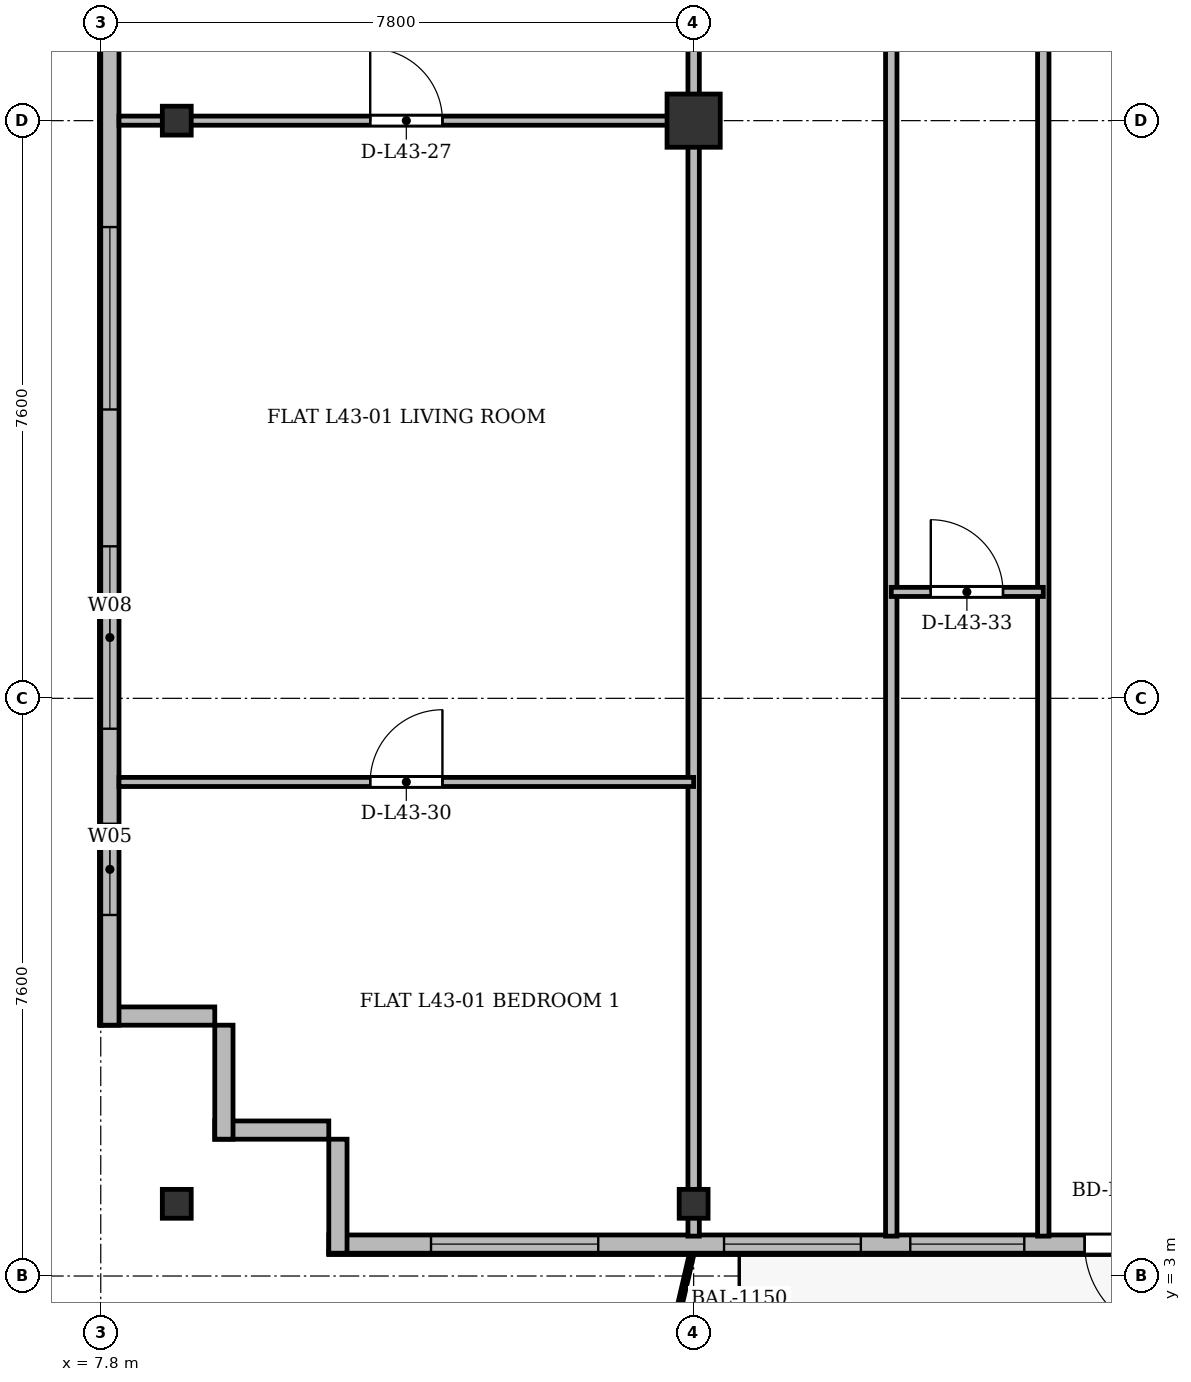
"""IFC4 building model, lengths in metres.
Left out: names, types, materials, properties, quantities, classifications, styles, units other than length and angle.
Written with IfcOpenShell. Run it as: python <this file> out.ifc"""

import sys

from ifc_helpers import new_model, si_unit, direction, frame, frame_2d, origin, origin_2d, place, context, subcontext, project, spatial, rectangle, i_section, extrude, source, transform, mapped, element, fill, save


model = new_model("IFC4")
c1 = context("Model", 3, precision=1e-05, world=origin(), true_north=direction((0.0, 1.0)))
c2 = subcontext(c1, "Body", "Model", "MODEL_VIEW")
j1 = project(units=[si_unit("LENGTHUNIT", "METRE"), si_unit("PLANEANGLEUNIT", "RADIAN")], contexts=[c1])
p1 = place(None, origin())
s1 = spatial("IfcSite", under=j1, at=p1, CompositionType="ELEMENT")
p2 = place(p1, origin())
s2 = spatial("IfcBuilding", under=s1, at=p2, CompositionType="ELEMENT")
p3 = place(p2, frame((0.0, 0.0, 164.5)))
s3 = spatial("IfcBuildingStorey", under=s2, at=p3, CompositionType="ELEMENT", Elevation=164.5)
m1 = source(origin(), c2, "Body", "SweptSolid", [
    extrude(i_section(OverallWidth=0.38, OverallDepth=0.38, WebThickness=0.02, FlangeThickness=0.03, at=origin_2d()), origin(), (0.0, 0.0, 1.0), 3.6),
])
for number, where, z_axis, x_axis in (
    (1, (8.8, 3.95, 0.0), (0.0, 0.0, 1.0), (1.0, 0.0, 0.0)),
    (2, (8.8, 18.2, 0.0), (0.0, 0.0, 1.0), (1.0, 0.0, 0.0)),
    (3, (15.6, 3.95, 0.0), (0.0, 0.0, 1.0), (1.0, 0.0, 0.0)),
):
    element("IfcColumn", number, at=place(p3, frame(where, z_axis=z_axis, x_axis=x_axis)), inside=s3, PredefinedType="COLUMN", context=c2, shape_type="MappedRepresentation", body=[
        mapped(m1, transform((0.0, 0.0, 0.0), x_axis=(1.0, 0.0, 0.0), y_axis=(0.0, 1.0, 0.0), z_axis=(0.0, 0.0, 1.0), scale=1.0)),
    ])
m2 = source(origin(), c2, "Body", "SweptSolid", [
    extrude(rectangle(XDim=0.7, YDim=0.7, at=origin_2d()), origin(), (0.0, 0.0, 1.0), 3.6),
])
p4 = place(p3, frame((15.6, 18.2, 0.0), z_axis=(0.0, 0.0, 1.0), x_axis=(1.0, 0.0, 0.0)))
e4 = element("IfcColumn", 4, at=p4, inside=s3, PredefinedType="COLUMN", context=c2, shape_type="MappedRepresentation", body=[
    mapped(m2, transform((0.0, 0.0, 0.0), x_axis=(1.0, 0.0, 0.0), y_axis=(0.0, 1.0, 0.0), z_axis=(0.0, 0.0, 1.0), scale=1.0)),
])
for number, where, z_axis, x_axis in (
    (5, (10.8, 4.92, 0.0), (0.0, 0.0, 1.0), (-1.0, 0.0, 0.0)),
    (6, (9.42, 4.8, 0.0), (0.0, 0.0, 1.0), (0.0, 1.0, 0.0)),
):
    element("IfcWall", number, at=place(p3, frame(where, z_axis=z_axis, x_axis=x_axis)), inside=s3, PredefinedType="SOLIDWALL", context=c2, shape_type="SweptSolid", body=[
        extrude(rectangle(XDim=1.5, YDim=0.24, at=frame_2d((0.75, 0.0))), origin(), (0.0, 0.0, 1.0), 3.35),
    ])
p5 = place(p3, frame((9.3, 6.42, 0.0), z_axis=(0.0, 0.0, 1.0), x_axis=(-1.0, 0.0, 0.0)))
e7 = element("IfcWall", 7, at=p5, inside=s3, PredefinedType="SOLIDWALL", context=c2, shape_type="SweptSolid", body=[
    extrude(rectangle(XDim=1.5, YDim=0.24, at=frame_2d((0.75, 0.0))), origin(), (0.0, 0.0, 1.0), 2.85),
])
p6 = place(p3, frame((7.92, 6.3, 0.0), z_axis=(0.0, 0.0, 1.0), x_axis=(0.0, 1.0, 0.0)))
e8 = element("IfcWall", 8, at=p6, inside=s3, PredefinedType="SOLIDWALL", context=c2, shape_type="SweptSolid", body=[
    extrude(rectangle(XDim=39.2, YDim=0.24, at=frame_2d((19.6, 0.0))), origin(), (0.0, 0.0, 1.0), 3.35),
])
p7 = place(p6, frame((1.45, 0.0, 0.92)))
e9 = element("IfcOpeningElement", 9, at=p7, cuts=e8, PredefinedType="OPENING", context=c2, shape_type="SweptSolid", body=[
    extrude(rectangle(XDim=1.2, YDim=1.65, at=frame_2d((0.6, 0.825))), frame((0.0, 0.13, 0.0), z_axis=(0.0, -1.0, 0.0), x_axis=(1.0, 0.0, 0.0)), (0.0, 0.0, 1.0), 0.26),
])
p8 = place(p6, frame((3.9, 0.0, 0.92)))
e10 = element("IfcOpeningElement", 10, at=p8, cuts=e8, PredefinedType="OPENING", context=c2, shape_type="SweptSolid", body=[
    extrude(rectangle(XDim=2.4, YDim=2.1, at=frame_2d((1.2, 1.05))), frame((0.0, 0.13, 0.0), z_axis=(0.0, -1.0, 0.0), x_axis=(1.0, 0.0, 0.0)), (0.0, 0.0, 1.0), 0.26),
])
p9 = place(p6, frame((8.1, 0.0, 0.92)))
e11 = element("IfcOpeningElement", 11, at=p9, cuts=e8, PredefinedType="OPENING", context=c2, shape_type="SweptSolid", body=[
    extrude(rectangle(XDim=2.4, YDim=2.1, at=frame_2d((1.2, 1.05))), frame((0.0, 0.13, 0.0), z_axis=(0.0, -1.0, 0.0), x_axis=(1.0, 0.0, 0.0)), (0.0, 0.0, 1.0), 0.26),
])
p10 = place(p6, frame((15.3, 0.0, 0.92)))
e12 = element("IfcOpeningElement", 12, at=p10, cuts=e8, PredefinedType="OPENING", context=c2, shape_type="SweptSolid", body=[
    extrude(rectangle(XDim=2.4, YDim=2.1, at=frame_2d((1.2, 1.05))), frame((0.0, 0.13, 0.0), z_axis=(0.0, -1.0, 0.0), x_axis=(1.0, 0.0, 0.0)), (0.0, 0.0, 1.0), 0.26),
])
p11 = place(p6, frame((29.3, 0.0, 0.92)))
e13 = element("IfcOpeningElement", 13, at=p11, cuts=e8, PredefinedType="OPENING", context=c2, shape_type="SweptSolid", body=[
    extrude(rectangle(XDim=2.4, YDim=2.1, at=frame_2d((1.2, 1.05))), frame((0.0, 0.13, 0.0), z_axis=(0.0, -1.0, 0.0), x_axis=(1.0, 0.0, 0.0)), (0.0, 0.0, 1.0), 0.26),
])
p12 = place(p6, frame((36.85, 0.0, 0.92)))
e14 = element("IfcOpeningElement", 14, at=p12, cuts=e8, PredefinedType="OPENING", context=c2, shape_type="SweptSolid", body=[
    extrude(rectangle(XDim=1.2, YDim=1.65, at=frame_2d((0.6, 0.825))), frame((0.0, 0.13, 0.0), z_axis=(0.0, -1.0, 0.0), x_axis=(1.0, 0.0, 0.0)), (0.0, 0.0, 1.0), 0.26),
])
p13 = place(p3, frame((63.6, 3.42, 0.0), z_axis=(0.0, 0.0, 1.0), x_axis=(-1.0, 0.0, 0.0)))
e15 = element("IfcWall", 15, at=p13, inside=s3, PredefinedType="SOLIDWALL", context=c2, shape_type="SweptSolid", body=[
    extrude(rectangle(XDim=52.8, YDim=0.24, at=frame_2d((26.4, 0.0))), origin(), (0.0, 0.0, 1.0), 3.35),
])
p14 = place(p13, frame((1.445, 0.0, 0.9)))
e16 = element("IfcOpeningElement", 16, at=p14, cuts=e15, PredefinedType="OPENING", context=c2, shape_type="SweptSolid", body=[
    extrude(rectangle(XDim=2.0, YDim=1.95, at=frame_2d((1.0, 0.975))), frame((0.0, 0.13, 0.0), z_axis=(0.0, -1.0, 0.0), x_axis=(1.0, 0.0, 0.0)), (0.0, 0.0, 1.0), 0.26),
])
p15 = place(p13, frame((5.275, 0.0, 0.9)))
e17 = element("IfcOpeningElement", 17, at=p15, cuts=e15, PredefinedType="OPENING", context=c2, shape_type="SweptSolid", body=[
    extrude(rectangle(XDim=1.65, YDim=1.85, at=frame_2d((0.825, 0.925))), frame((0.0, 0.13, 0.0), z_axis=(0.0, -1.0, 0.0), x_axis=(1.0, 0.0, 0.0)), (0.0, 0.0, 1.0), 0.26),
])
p16 = place(p13, frame((7.65, 0.0, 0.9)))
e18 = element("IfcOpeningElement", 18, at=p16, cuts=e15, PredefinedType="OPENING", context=c2, shape_type="SweptSolid", body=[
    extrude(rectangle(XDim=1.5, YDim=1.75, at=frame_2d((0.75, 0.875))), frame((0.0, 0.13, 0.0), z_axis=(0.0, -1.0, 0.0), x_axis=(1.0, 0.0, 0.0)), (0.0, 0.0, 1.0), 0.26),
])
p17 = place(p13, frame((9.9, 0.0, 0.9)))
e19 = element("IfcOpeningElement", 19, at=p17, cuts=e15, PredefinedType="OPENING", context=c2, shape_type="SweptSolid", body=[
    extrude(rectangle(XDim=2.2, YDim=1.8, at=frame_2d((1.1, 0.9))), frame((0.0, 0.13, 0.0), z_axis=(0.0, -1.0, 0.0), x_axis=(1.0, 0.0, 0.0)), (0.0, 0.0, 1.0), 0.26),
])
p18 = place(p13, frame((13.62, 0.0, 0.0)))
e20 = element("IfcOpeningElement", 20, at=p18, cuts=e15, PredefinedType="OPENING", context=c2, shape_type="SweptSolid", body=[
    extrude(rectangle(XDim=1.2, YDim=2.2, at=frame_2d((0.6, 1.1))), frame((0.0, 0.13, 0.0), z_axis=(0.0, -1.0, 0.0), x_axis=(1.0, 0.0, 0.0)), (0.0, 0.0, 1.0), 0.26),
])
p19 = place(p13, frame((15.45, 0.0, 0.9)))
e21 = element("IfcOpeningElement", 21, at=p19, cuts=e15, PredefinedType="OPENING", context=c2, shape_type="SweptSolid", body=[
    extrude(rectangle(XDim=1.5, YDim=1.75, at=frame_2d((0.75, 0.875))), frame((0.0, 0.13, 0.0), z_axis=(0.0, -1.0, 0.0), x_axis=(1.0, 0.0, 0.0)), (0.0, 0.0, 1.0), 0.26),
])
p20 = place(p13, frame((17.775, 0.0, 0.9)))
e22 = element("IfcOpeningElement", 22, at=p20, cuts=e15, PredefinedType="OPENING", context=c2, shape_type="SweptSolid", body=[
    extrude(rectangle(XDim=1.65, YDim=1.85, at=frame_2d((0.825, 0.925))), frame((0.0, 0.13, 0.0), z_axis=(0.0, -1.0, 0.0), x_axis=(1.0, 0.0, 0.0)), (0.0, 0.0, 1.0), 0.26),
])
p21 = place(p13, frame((22.2, 0.0, 0.9)))
e23 = element("IfcOpeningElement", 23, at=p21, cuts=e15, PredefinedType="OPENING", context=c2, shape_type="SweptSolid", body=[
    extrude(rectangle(XDim=1.8, YDim=1.8, at=frame_2d((0.9, 0.9))), frame((0.0, 0.13, 0.0), z_axis=(0.0, -1.0, 0.0), x_axis=(1.0, 0.0, 0.0)), (0.0, 0.0, 1.0), 0.26),
])
p22 = place(p13, frame((28.6, 0.0, 0.9)))
e24 = element("IfcOpeningElement", 24, at=p22, cuts=e15, PredefinedType="OPENING", context=c2, shape_type="SweptSolid", body=[
    extrude(rectangle(XDim=2.2, YDim=1.8, at=frame_2d((1.1, 0.9))), frame((0.0, 0.13, 0.0), z_axis=(0.0, -1.0, 0.0), x_axis=(1.0, 0.0, 0.0)), (0.0, 0.0, 1.0), 0.26),
])
p23 = place(p13, frame((35.85, 0.0, 0.9)))
e25 = element("IfcOpeningElement", 25, at=p23, cuts=e15, PredefinedType="OPENING", context=c2, shape_type="SweptSolid", body=[
    extrude(rectangle(XDim=1.5, YDim=1.75, at=frame_2d((0.75, 0.875))), frame((0.0, 0.13, 0.0), z_axis=(0.0, -1.0, 0.0), x_axis=(1.0, 0.0, 0.0)), (0.0, 0.0, 1.0), 0.26),
])
p24 = place(p13, frame((41.656, 0.0, 0.0)))
e26 = element("IfcOpeningElement", 26, at=p24, cuts=e15, PredefinedType="OPENING", context=c2, shape_type="SweptSolid", body=[
    extrude(rectangle(XDim=1.2, YDim=2.2, at=frame_2d((0.6, 1.1))), frame((0.0, 0.13, 0.0), z_axis=(0.0, -1.0, 0.0), x_axis=(1.0, 0.0, 0.0)), (0.0, 0.0, 1.0), 0.26),
])
p25 = place(p13, frame((43.65, 0.0, 0.9)))
e27 = element("IfcOpeningElement", 27, at=p25, cuts=e15, PredefinedType="OPENING", context=c2, shape_type="SweptSolid", body=[
    extrude(rectangle(XDim=1.5, YDim=1.75, at=frame_2d((0.75, 0.875))), frame((0.0, 0.13, 0.0), z_axis=(0.0, -1.0, 0.0), x_axis=(1.0, 0.0, 0.0)), (0.0, 0.0, 1.0), 0.26),
])
p26 = place(p13, frame((45.8, 0.0, 0.9)))
e28 = element("IfcOpeningElement", 28, at=p26, cuts=e15, PredefinedType="OPENING", context=c2, shape_type="SweptSolid", body=[
    extrude(rectangle(XDim=1.8, YDim=1.8, at=frame_2d((0.9, 0.9))), frame((0.0, 0.13, 0.0), z_axis=(0.0, -1.0, 0.0), x_axis=(1.0, 0.0, 0.0)), (0.0, 0.0, 1.0), 0.26),
])
p27 = place(p13, frame((49.255, 0.0, 0.9)))
e29 = element("IfcOpeningElement", 29, at=p27, cuts=e15, PredefinedType="OPENING", context=c2, shape_type="SweptSolid", body=[
    extrude(rectangle(XDim=2.2, YDim=1.8, at=frame_2d((1.1, 0.9))), frame((0.0, 0.13, 0.0), z_axis=(0.0, -1.0, 0.0), x_axis=(1.0, 0.0, 0.0)), (0.0, 0.0, 1.0), 0.26),
])
p28 = place(p3, frame((10.92, 3.3, 0.0), z_axis=(0.0, 0.0, 1.0), x_axis=(0.0, 1.0, 0.0)))
e30 = element("IfcWall", 30, at=p28, inside=s3, PredefinedType="SOLIDWALL", context=c2, shape_type="SweptSolid", body=[
    extrude(rectangle(XDim=1.5, YDim=0.24, at=frame_2d((0.75, 0.0))), origin(), (0.0, 0.0, 1.0), 2.75),
])
p29 = place(p3, frame((15.6, 3.525, 0.0), z_axis=(0.0, 0.0, 1.0), x_axis=(0.0, 1.0, 0.0)))
e31 = element("IfcWall", 31, at=p29, inside=s3, PredefinedType="PARTITIONING", context=c2, shape_type="SweptSolid", body=[
    extrude(rectangle(XDim=27.275, YDim=0.15, at=frame_2d((13.638, 0.0))), origin(), (0.0, 0.0, 1.0), 2.85),
])
p30 = place(p3, frame((8.04, 18.2, 0.0), z_axis=(0.0, 0.0, 1.0), x_axis=(1.0, 0.0, 0.0)))
e32 = element("IfcWall", 32, at=p30, inside=s3, PredefinedType="PARTITIONING", context=c2, shape_type="SweptSolid", body=[
    extrude(rectangle(XDim=7.56, YDim=0.12, at=frame_2d((3.78, 0.0))), origin(), (0.0, 0.0, 1.0), 2.75),
])
p31 = place(p30, frame((3.305, 0.0, 0.0)))
e33 = element("IfcOpeningElement", 33, at=p31, cuts=e32, PredefinedType="OPENING", context=c2, shape_type="SweptSolid", body=[
    extrude(rectangle(XDim=0.95, YDim=2.15, at=frame_2d((0.475, 1.075))), frame((0.0, 0.07, 0.0), z_axis=(0.0, -1.0, 0.0), x_axis=(1.0, 0.0, 0.0)), (0.0, 0.0, 1.0), 0.14),
])
p32 = place(p3, frame((8.04, 9.5, 0.0), z_axis=(0.0, 0.0, 1.0), x_axis=(1.0, 0.0, 0.0)))
e34 = element("IfcWall", 34, at=p32, inside=s3, PredefinedType="PARTITIONING", context=c2, shape_type="SweptSolid", body=[
    extrude(rectangle(XDim=7.56, YDim=0.12, at=frame_2d((3.78, 0.0))), origin(), (0.0, 0.0, 1.0), 2.85),
])
p33 = place(p32, frame((3.305, 0.0, 0.0)))
e35 = element("IfcOpeningElement", 35, at=p33, cuts=e34, PredefinedType="OPENING", context=c2, shape_type="SweptSolid", body=[
    extrude(rectangle(XDim=0.95, YDim=2.15, at=frame_2d((0.475, 1.075))), frame((0.0, 0.07, 0.0), z_axis=(0.0, -1.0, 0.0), x_axis=(1.0, 0.0, 0.0)), (0.0, 0.0, 1.0), 0.14),
])
for number, where, z_axis, x_axis in (
    (36, (18.2, 3.525, 0.0), (0.0, 0.0, 1.0), (0.0, 1.0, 0.0)),
    (37, (20.2, 3.525, 0.0), (0.0, 0.0, 1.0), (0.0, 1.0, 0.0)),
):
    element("IfcWall", number, at=place(p3, frame(where, z_axis=z_axis, x_axis=x_axis)), inside=s3, PredefinedType="PARTITIONING", context=c2, shape_type="SweptSolid", body=[
        extrude(rectangle(XDim=27.275, YDim=0.15, at=frame_2d((13.638, 0.0))), origin(), (0.0, 0.0, 1.0), 2.75),
    ])
p34 = place(p3, frame((18.2, 12.0, 0.0), z_axis=(0.0, 0.0, 1.0), x_axis=(1.0, 0.0, 0.0)))
e38 = element("IfcWall", 38, at=p34, inside=s3, PredefinedType="PARTITIONING", context=c2, shape_type="SweptSolid", body=[
    extrude(rectangle(XDim=2.0, YDim=0.12, at=frame_2d((1.0, 0.0))), origin(), (0.0, 0.0, 1.0), 3.35),
])
p35 = place(p34, frame((0.52, 0.0, 0.0)))
e39 = element("IfcOpeningElement", 39, at=p35, cuts=e38, PredefinedType="OPENING", context=c2, shape_type="SweptSolid", body=[
    extrude(rectangle(XDim=0.95, YDim=2.15, at=frame_2d((0.475, 1.075))), frame((0.0, 0.07, 0.0), z_axis=(0.0, -1.0, 0.0), x_axis=(1.0, 0.0, 0.0)), (0.0, 0.0, 1.0), 0.14),
])
m3 = source(origin(), c2, "Body", "SweptSolid", [
    extrude(rectangle(XDim=1.2, YDim=1.65, at=frame_2d((0.6, 0.825))), frame((0.0, 0.03, 0.0), z_axis=(0.0, -1.0, 0.0), x_axis=(1.0, 0.0, 0.0)), (0.0, 0.0, 1.0), 0.06),
])
p36 = place(p7, origin())
e40 = element("IfcWindow", 40, at=p36, inside=s3, PartitioningType="SINGLE_PANEL", PredefinedType="WINDOW", context=c2, shape_type="MappedRepresentation", body=[
    mapped(m3, transform((0.0, 0.0, 0.0), x_axis=(1.0, 0.0, 0.0), y_axis=(0.0, 1.0, 0.0), z_axis=(0.0, 0.0, 1.0), scale=1.0)),
])
fill(e9, e40)
m4 = source(origin(), c2, "Body", "SweptSolid", [
    extrude(rectangle(XDim=2.4, YDim=2.1, at=frame_2d((1.2, 1.05))), frame((0.0, 0.03, 0.0), z_axis=(0.0, -1.0, 0.0), x_axis=(1.0, 0.0, 0.0)), (0.0, 0.0, 1.0), 0.06),
])
p37 = place(p8, origin())
e41 = element("IfcWindow", 41, at=p37, inside=s3, PartitioningType="SINGLE_PANEL", PredefinedType="WINDOW", context=c2, shape_type="MappedRepresentation", body=[
    mapped(m4, transform((0.0, 0.0, 0.0), x_axis=(1.0, 0.0, 0.0), y_axis=(0.0, 1.0, 0.0), z_axis=(0.0, 0.0, 1.0), scale=1.0)),
])
fill(e10, e41)
p38 = place(p9, origin())
e42 = element("IfcWindow", 42, at=p38, inside=s3, PartitioningType="SINGLE_PANEL", PredefinedType="WINDOW", context=c2, shape_type="MappedRepresentation", body=[
    mapped(m4, transform((0.0, 0.0, 0.0), x_axis=(1.0, 0.0, 0.0), y_axis=(0.0, 1.0, 0.0), z_axis=(0.0, 0.0, 1.0), scale=1.0)),
])
fill(e11, e42)
m5 = source(origin(), c2, "Body", "SweptSolid", [
    extrude(rectangle(XDim=1.2, YDim=2.2, at=frame_2d((0.6, 1.1))), frame((0.0, 0.025, 0.0), z_axis=(0.0, -1.0, 0.0), x_axis=(1.0, 0.0, 0.0)), (0.0, 0.0, 1.0), 0.05),
])
p39 = place(p24, origin())
e43 = element("IfcDoor", 43, at=p39, inside=s3, OperationType="SINGLE_SWING_LEFT", PredefinedType="DOOR", context=c2, shape_type="MappedRepresentation", body=[
    mapped(m5, transform((0.0, 0.0, 0.0), x_axis=(1.0, 0.0, 0.0), y_axis=(0.0, 1.0, 0.0), z_axis=(0.0, 0.0, 1.0), scale=1.0)),
])
fill(e26, e43)
m6 = source(origin(), c2, "Body", "SweptSolid", [
    extrude(rectangle(XDim=1.5, YDim=1.75, at=frame_2d((0.75, 0.875))), frame((0.0, 0.03, 0.0), z_axis=(0.0, -1.0, 0.0), x_axis=(1.0, 0.0, 0.0)), (0.0, 0.0, 1.0), 0.06),
])
p40 = place(p25, origin())
e44 = element("IfcWindow", 44, at=p40, inside=s3, PartitioningType="SINGLE_PANEL", PredefinedType="WINDOW", context=c2, shape_type="MappedRepresentation", body=[
    mapped(m6, transform((0.0, 0.0, 0.0), x_axis=(1.0, 0.0, 0.0), y_axis=(0.0, 1.0, 0.0), z_axis=(0.0, 0.0, 1.0), scale=1.0)),
])
fill(e27, e44)
m7 = source(origin(), c2, "Body", "SweptSolid", [
    extrude(rectangle(XDim=1.8, YDim=1.8, at=frame_2d((0.9, 0.9))), frame((0.0, 0.03, 0.0), z_axis=(0.0, -1.0, 0.0), x_axis=(1.0, 0.0, 0.0)), (0.0, 0.0, 1.0), 0.06),
])
p41 = place(p26, origin())
e45 = element("IfcWindow", 45, at=p41, inside=s3, PartitioningType="SINGLE_PANEL", PredefinedType="WINDOW", context=c2, shape_type="MappedRepresentation", body=[
    mapped(m7, transform((0.0, 0.0, 0.0), x_axis=(1.0, 0.0, 0.0), y_axis=(0.0, 1.0, 0.0), z_axis=(0.0, 0.0, 1.0), scale=1.0)),
])
fill(e28, e45)
m8 = source(origin(), c2, "Body", "SweptSolid", [
    extrude(rectangle(XDim=2.2, YDim=1.8, at=frame_2d((1.1, 0.9))), frame((0.0, 0.03, 0.0), z_axis=(0.0, -1.0, 0.0), x_axis=(1.0, 0.0, 0.0)), (0.0, 0.0, 1.0), 0.06),
])
p42 = place(p27, origin())
e46 = element("IfcWindow", 46, at=p42, inside=s3, PartitioningType="SINGLE_PANEL", PredefinedType="WINDOW", context=c2, shape_type="MappedRepresentation", body=[
    mapped(m8, transform((0.0, 0.0, 0.0), x_axis=(1.0, 0.0, 0.0), y_axis=(0.0, 1.0, 0.0), z_axis=(0.0, 0.0, 1.0), scale=1.0)),
])
fill(e29, e46)
m9 = source(origin(), c2, "Body", "SweptSolid", [
    extrude(rectangle(XDim=0.95, YDim=2.15, at=frame_2d((0.475, 1.075))), frame((0.0, 0.025, 0.0), z_axis=(0.0, -1.0, 0.0), x_axis=(1.0, 0.0, 0.0)), (0.0, 0.0, 1.0), 0.05),
])
p43 = place(p31, origin())
e47 = element("IfcDoor", 47, at=p43, inside=s3, OperationType="SINGLE_SWING_LEFT", PredefinedType="DOOR", context=c2, shape_type="MappedRepresentation", body=[
    mapped(m9, transform((0.0, 0.0, 0.0), x_axis=(1.0, 0.0, 0.0), y_axis=(0.0, 1.0, 0.0), z_axis=(0.0, 0.0, 1.0), scale=1.0)),
])
fill(e33, e47)
p44 = place(p33, origin())
e48 = element("IfcDoor", 48, at=p44, inside=s3, OperationType="SINGLE_SWING_RIGHT", PredefinedType="DOOR", context=c2, shape_type="MappedRepresentation", body=[
    mapped(m9, transform((0.0, 0.0, 0.0), x_axis=(1.0, 0.0, 0.0), y_axis=(0.0, 1.0, 0.0), z_axis=(0.0, 0.0, 1.0), scale=1.0)),
])
fill(e35, e48)
p45 = place(p35, origin())
e49 = element("IfcDoor", 49, at=p45, inside=s3, OperationType="SINGLE_SWING_LEFT", PredefinedType="DOOR", context=c2, shape_type="MappedRepresentation", body=[
    mapped(m9, transform((0.0, 0.0, 0.0), x_axis=(1.0, 0.0, 0.0), y_axis=(0.0, 1.0, 0.0), z_axis=(0.0, 0.0, 1.0), scale=1.0)),
])
fill(e39, e49)
save(model, sys.argv[1])
